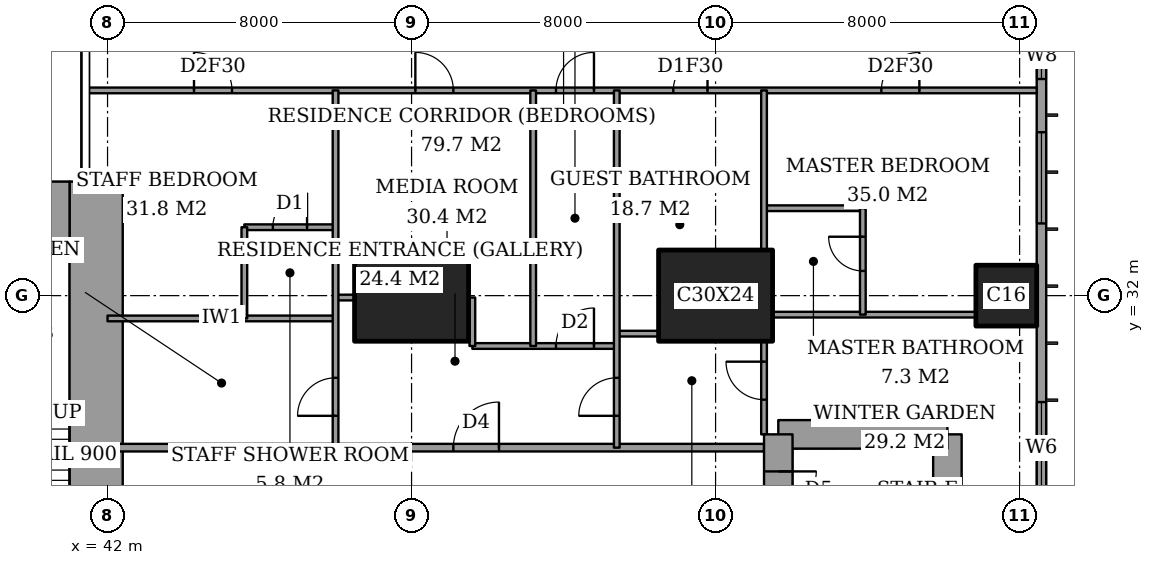
"""IFC4 building model, lengths in metres.
Left out: names, types, materials, properties, quantities, classifications, styles, units other than length and angle.
Written with IfcOpenShell. Run it as: python <this file> out.ifc"""

import sys

from ifc_helpers import new_model, si_unit, direction, frame, frame_2d, origin, origin_2d, place, context, subcontext, project, spatial, rectangle, extrude, element, fill, save


model = new_model("IFC4")
c1 = context("Model", 3, precision=1e-05, world=origin(), true_north=direction((0.0, 1.0)))
c2 = subcontext(c1, "Body", "Model", "MODEL_VIEW")
j1 = project(units=[si_unit("LENGTHUNIT", "METRE"), si_unit("PLANEANGLEUNIT", "RADIAN")], contexts=[c1])
p1 = place(None, origin())
s1 = spatial("IfcSite", under=j1, at=p1, CompositionType="ELEMENT")
p2 = place(p1, origin())
s2 = spatial("IfcBuilding", under=s1, at=p2, CompositionType="ELEMENT")
p3 = place(p2, frame((0.0, 0.0, 273.6)))
s3 = spatial("IfcBuildingStorey", under=s2, at=p3, CompositionType="ELEMENT", Elevation=273.6)
for number, where, z_axis, x_axis in (
    (1, (50.0, 32.0, 0.0), (0.0, 0.0, 1.0), (1.0, 0.0, 0.0)),
    (2, (58.0, 32.0, 0.0), (0.0, 0.0, 1.0), (1.0, 0.0, 0.0)),
):
    element("IfcColumn", number, at=place(p3, frame(where, z_axis=z_axis, x_axis=x_axis)), inside=s3, PredefinedType="COLUMN", context=c2, shape_type="SweptSolid", body=[
        extrude(rectangle(XDim=3.0, YDim=2.4, at=origin_2d()), origin(), (0.0, 0.0, 1.0), 3.6),
    ])
p4 = place(p3, frame((65.65, 32.0, 0.0), z_axis=(0.0, 0.0, 1.0), x_axis=(1.0, 0.0, 0.0)))
e3 = element("IfcColumn", 3, at=p4, inside=s3, PredefinedType="COLUMN", context=c2, shape_type="SweptSolid", body=[
    extrude(rectangle(XDim=1.6, YDim=1.6, at=origin_2d()), origin(), (0.0, 0.0, 1.0), 3.6),
])
p5 = place(p3, frame((37.85, 34.0, 0.0), z_axis=(0.0, 0.0, 1.0), x_axis=(1.0, 0.0, 0.0)))
e4 = element("IfcWall", 4, at=p5, inside=s3, PredefinedType="SHEAR", context=c2, shape_type="SweptSolid", body=[
    extrude(rectangle(XDim=3.15, YDim=2.0, at=frame_2d((1.575, 0.0))), origin(), (0.0, 0.0, 1.0), 3.6),
])
p6 = place(p3, frame((41.7, 24.85, 0.0), z_axis=(0.0, 0.0, 1.0), x_axis=(0.0, 1.0, 0.0)))
e5 = element("IfcWall", 5, at=p6, inside=s3, PredefinedType="SHEAR", context=c2, shape_type="SweptSolid", body=[
    extrude(rectangle(XDim=10.15, YDim=1.4, at=frame_2d((5.075, 0.0))), origin(), (0.0, 0.0, 1.0), 3.6),
])
p7 = place(p3, frame((64.1, 19.65, 0.0), z_axis=(0.0, 0.0, 1.0), x_axis=(0.0, 1.0, 0.0)))
e6 = element("IfcWall", 6, at=p7, inside=s3, PredefinedType="SHEAR", context=c2, shape_type="SweptSolid", body=[
    extrude(rectangle(XDim=8.7, YDim=0.75, at=frame_2d((4.35, 0.0))), origin(), (0.0, 0.0, 1.0), 3.6),
])
p8 = place(p3, frame((64.1, 28.35, 0.0), z_axis=(0.0, 0.0, 1.0), x_axis=(-1.0, 0.0, 0.0)))
e7 = element("IfcWall", 7, at=p8, inside=s3, PredefinedType="SHEAR", context=c2, shape_type="SweptSolid", body=[
    extrude(rectangle(XDim=4.45, YDim=0.75, at=frame_2d((2.225, 0.0))), origin(), (0.0, 0.0, 1.0), 3.6),
])
p9 = place(p3, frame((59.65, 28.35, 0.0), z_axis=(0.0, 0.0, 1.0), x_axis=(0.0, -1.0, 0.0)))
e8 = element("IfcWall", 8, at=p9, inside=s3, PredefinedType="SHEAR", context=c2, shape_type="SweptSolid", body=[
    extrude(rectangle(XDim=8.7, YDim=0.75, at=frame_2d((4.35, 0.0))), origin(), (0.0, 0.0, 1.0), 3.6),
])
p10 = place(p9, frame((0.975, 0.0, 0.0)))
e9 = element("IfcOpeningElement", 9, at=p10, cuts=e8, PredefinedType="OPENING", context=c2, shape_type="SweptSolid", body=[
    extrude(rectangle(XDim=1.0, YDim=2.1, at=frame_2d((0.5, 1.05))), frame((0.0, 0.385, 0.0), z_axis=(0.0, -1.0, 0.0), x_axis=(1.0, 0.0, 0.0)), (0.0, 0.0, 1.0), 0.77),
])
p11 = place(p3, frame((66.575, 3.175, 0.0), z_axis=(0.0, 0.0, 1.0), x_axis=(0.0, 1.0, 0.0)))
e10 = element("IfcWall", 10, at=p11, inside=s3, PredefinedType="SOLIDWALL", context=c2, shape_type="SweptSolid", body=[
    extrude(rectangle(XDim=41.65, YDim=0.25, at=frame_2d((20.825, 0.0))), origin(), (0.0, 0.0, 1.0), 3.6),
])
p12 = place(p11, frame((0.875, 0.0, 0.6)))
e11 = element("IfcOpeningElement", 11, at=p12, cuts=e10, PredefinedType="OPENING", context=c2, shape_type="SweptSolid", body=[
    extrude(rectangle(XDim=2.4, YDim=2.0, at=frame_2d((1.2, 1.0))), frame((0.0, 0.135, 0.0), z_axis=(0.0, -1.0, 0.0), x_axis=(1.0, 0.0, 0.0)), (0.0, 0.0, 1.0), 0.27),
])
p13 = place(p11, frame((6.0, 0.0, 0.6)))
e12 = element("IfcOpeningElement", 12, at=p13, cuts=e10, PredefinedType="OPENING", context=c2, shape_type="SweptSolid", body=[
    extrude(rectangle(XDim=1.2, YDim=2.0, at=frame_2d((0.6, 1.0))), frame((0.0, 0.135, 0.0), z_axis=(0.0, -1.0, 0.0), x_axis=(1.0, 0.0, 0.0)), (0.0, 0.0, 1.0), 0.27),
])
p14 = place(p11, frame((8.525, 0.0, 0.6)))
e13 = element("IfcOpeningElement", 13, at=p14, cuts=e10, PredefinedType="OPENING", context=c2, shape_type="SweptSolid", body=[
    extrude(rectangle(XDim=2.4, YDim=2.0, at=frame_2d((1.2, 1.0))), frame((0.0, 0.135, 0.0), z_axis=(0.0, -1.0, 0.0), x_axis=(1.0, 0.0, 0.0)), (0.0, 0.0, 1.0), 0.27),
])
p15 = place(p11, frame((15.725, 0.0, 0.6)))
e14 = element("IfcOpeningElement", 14, at=p15, cuts=e10, PredefinedType="OPENING", context=c2, shape_type="SweptSolid", body=[
    extrude(rectangle(XDim=2.4, YDim=2.0, at=frame_2d((1.2, 1.0))), frame((0.0, 0.135, 0.0), z_axis=(0.0, -1.0, 0.0), x_axis=(1.0, 0.0, 0.0)), (0.0, 0.0, 1.0), 0.27),
])
p16 = place(p11, frame((23.625, 0.0, 0.6)))
e15 = element("IfcOpeningElement", 15, at=p16, cuts=e10, PredefinedType="OPENING", context=c2, shape_type="SweptSolid", body=[
    extrude(rectangle(XDim=2.4, YDim=2.0, at=frame_2d((1.2, 1.0))), frame((0.0, 0.135, 0.0), z_axis=(0.0, -1.0, 0.0), x_axis=(1.0, 0.0, 0.0)), (0.0, 0.0, 1.0), 0.27),
])
p17 = place(p11, frame((30.725, 0.0, 0.6)))
e16 = element("IfcOpeningElement", 16, at=p17, cuts=e10, PredefinedType="OPENING", context=c2, shape_type="SweptSolid", body=[
    extrude(rectangle(XDim=2.4, YDim=2.0, at=frame_2d((1.2, 1.0))), frame((0.0, 0.135, 0.0), z_axis=(0.0, -1.0, 0.0), x_axis=(1.0, 0.0, 0.0)), (0.0, 0.0, 1.0), 0.27),
])
p18 = place(p11, frame((34.525, 0.0, 0.6)))
e17 = element("IfcOpeningElement", 17, at=p18, cuts=e10, PredefinedType="OPENING", context=c2, shape_type="SweptSolid", body=[
    extrude(rectangle(XDim=1.2, YDim=2.0, at=frame_2d((0.6, 1.0))), frame((0.0, 0.135, 0.0), z_axis=(0.0, -1.0, 0.0), x_axis=(1.0, 0.0, 0.0)), (0.0, 0.0, 1.0), 0.27),
])
p19 = place(p11, frame((38.375, 0.0, 0.6)))
e18 = element("IfcOpeningElement", 18, at=p19, cuts=e10, PredefinedType="OPENING", context=c2, shape_type="SweptSolid", body=[
    extrude(rectangle(XDim=2.4, YDim=2.0, at=frame_2d((1.2, 1.0))), frame((0.0, 0.135, 0.0), z_axis=(0.0, -1.0, 0.0), x_axis=(1.0, 0.0, 0.0)), (0.0, 0.0, 1.0), 0.27),
])
p20 = place(p3, frame((42.0, 28.0, 0.0), z_axis=(0.0, 0.0, 1.0), x_axis=(1.0, 0.0, 0.0)))
e19 = element("IfcWall", 19, at=p20, inside=s3, PredefinedType="PARTITIONING", context=c2, shape_type="SweptSolid", body=[
    extrude(rectangle(XDim=17.275, YDim=0.2, at=frame_2d((8.637, 0.0))), origin(), (0.0, 0.0, 1.0), 3.25),
])
p21 = place(p20, frame((9.1, 0.0, 0.0)))
e20 = element("IfcOpeningElement", 20, at=p21, cuts=e19, PredefinedType="OPENING", context=c2, shape_type="SweptSolid", body=[
    extrude(rectangle(XDim=1.2, YDim=2.4, at=frame_2d((0.6, 1.2))), frame((0.0, 0.11, 0.0), z_axis=(0.0, -1.0, 0.0), x_axis=(1.0, 0.0, 0.0)), (0.0, 0.0, 1.0), 0.22),
])
p22 = place(p3, frame((51.6, 30.675, 0.0), z_axis=(0.0, 0.0, 1.0), x_axis=(1.0, 0.0, 0.0)))
e21 = element("IfcWall", 21, at=p22, inside=s3, PredefinedType="PARTITIONING", context=c2, shape_type="SweptSolid", body=[
    extrude(rectangle(XDim=3.8, YDim=0.15, at=frame_2d((1.9, 0.0))), origin(), (0.0, 0.0, 1.0), 3.25),
])
p23 = place(p22, frame((2.2, 0.0, 0.0)))
e22 = element("IfcOpeningElement", 22, at=p23, cuts=e21, PredefinedType="OPENING", context=c2, shape_type="SweptSolid", body=[
    extrude(rectangle(XDim=1.0, YDim=2.1, at=frame_2d((0.5, 1.05))), frame((0.0, 0.085, 0.0), z_axis=(0.0, -1.0, 0.0), x_axis=(1.0, 0.0, 0.0)), (0.0, 0.0, 1.0), 0.17),
])
p24 = place(p3, frame((55.4, 31.0, 0.0), z_axis=(0.0, 0.0, 1.0), x_axis=(1.0, 0.0, 0.0)))
e23 = element("IfcWall", 23, at=p24, inside=s3, PredefinedType="PARTITIONING", context=c2, shape_type="SweptSolid", body=[
    extrude(rectangle(XDim=1.1, YDim=0.15, at=frame_2d((0.55, 0.0))), origin(), (0.0, 0.0, 1.0), 3.25),
])
p25 = place(p3, frame((42.0, 31.4, 0.0), z_axis=(0.0, 0.0, 1.0), x_axis=(1.0, 0.0, 0.0)))
e24 = element("IfcWall", 24, at=p25, inside=s3, PredefinedType="PARTITIONING", context=c2, shape_type="SweptSolid", body=[
    extrude(rectangle(XDim=6.0, YDim=0.15, at=frame_2d((3.0, 0.0))), origin(), (0.0, 0.0, 1.0), 3.25),
])
p26 = place(p3, frame((59.5, 31.5, 0.0), z_axis=(0.0, 0.0, 1.0), x_axis=(1.0, 0.0, 0.0)))
e25 = element("IfcWall", 25, at=p26, inside=s3, PredefinedType="PARTITIONING", context=c2, shape_type="SweptSolid", body=[
    extrude(rectangle(XDim=5.35, YDim=0.15, at=frame_2d((2.675, 0.0))), origin(), (0.0, 0.0, 1.0), 3.25),
])
p27 = place(p3, frame((48.0, 31.95, 0.0), z_axis=(0.0, 0.0, 1.0), x_axis=(1.0, 0.0, 0.0)))
e26 = element("IfcWall", 26, at=p27, inside=s3, PredefinedType="PARTITIONING", context=c2, shape_type="SweptSolid", body=[
    extrude(rectangle(XDim=0.5, YDim=0.15, at=frame_2d((0.25, 0.0))), origin(), (0.0, 0.0, 1.0), 3.25),
])
p28 = place(p3, frame((45.6, 33.8, 0.0), z_axis=(0.0, 0.0, 1.0), x_axis=(1.0, 0.0, 0.0)))
e27 = element("IfcWall", 27, at=p28, inside=s3, PredefinedType="PARTITIONING", context=c2, shape_type="SweptSolid", body=[
    extrude(rectangle(XDim=2.4, YDim=0.15, at=frame_2d((1.2, 0.0))), origin(), (0.0, 0.0, 1.0), 3.25),
])
p29 = place(p28, frame((0.75, 0.0, 0.0)))
e28 = element("IfcOpeningElement", 28, at=p29, cuts=e27, PredefinedType="OPENING", context=c2, shape_type="SweptSolid", body=[
    extrude(rectangle(XDim=0.9, YDim=2.1, at=frame_2d((0.45, 1.05))), frame((0.0, 0.085, 0.0), z_axis=(0.0, -1.0, 0.0), x_axis=(1.0, 0.0, 0.0)), (0.0, 0.0, 1.0), 0.17),
])
p30 = place(p3, frame((59.275, 34.3, 0.0), z_axis=(0.0, 0.0, 1.0), x_axis=(1.0, 0.0, 0.0)))
e29 = element("IfcWall", 29, at=p30, inside=s3, PredefinedType="PARTITIONING", context=c2, shape_type="SweptSolid", body=[
    extrude(rectangle(XDim=2.6, YDim=0.15, at=frame_2d((1.3, 0.0))), origin(), (0.0, 0.0, 1.0), 3.25),
])
p31 = place(p3, frame((41.439, 37.4, 0.0), z_axis=(0.0, 0.0, 1.0), x_axis=(1.0, 0.0, 0.0)))
e30 = element("IfcWall", 30, at=p31, inside=s3, PredefinedType="PARTITIONING", context=c2, shape_type="SweptSolid", body=[
    extrude(rectangle(XDim=25.011, YDim=0.15, at=frame_2d((12.505, 0.0))), origin(), (0.0, 0.0, 1.0), 3.25),
])
p32 = place(p31, frame((12.361, 0.0, 0.0)))
e31 = element("IfcOpeningElement", 31, at=p32, cuts=e30, PredefinedType="OPENING", context=c2, shape_type="SweptSolid", body=[
    extrude(rectangle(XDim=1.0, YDim=2.1, at=frame_2d((0.5, 1.05))), frame((0.0, 0.085, 0.0), z_axis=(0.0, -1.0, 0.0), x_axis=(1.0, 0.0, 0.0)), (0.0, 0.0, 1.0), 0.17),
])
p33 = place(p31, frame((20.924, 0.0, 0.0)))
e32 = element("IfcOpeningElement", 32, at=p33, cuts=e30, PredefinedType="OPENING", context=c2, shape_type="SweptSolid", body=[
    extrude(rectangle(XDim=1.0, YDim=2.1, at=frame_2d((0.5, 1.05))), frame((0.0, 0.085, 0.0), z_axis=(0.0, -1.0, 0.0), x_axis=(1.0, 0.0, 0.0)), (0.0, 0.0, 1.0), 0.17),
])
p34 = place(p31, frame((15.448, 0.0, 0.0)))
e33 = element("IfcOpeningElement", 33, at=p34, cuts=e30, PredefinedType="OPENING", context=c2, shape_type="SweptSolid", body=[
    extrude(rectangle(XDim=0.9, YDim=2.1, at=frame_2d((0.45, 1.05))), frame((0.0, 0.085, 0.0), z_axis=(0.0, -1.0, 0.0), x_axis=(1.0, 0.0, 0.0)), (0.0, 0.0, 1.0), 0.17),
])
p35 = place(p31, frame((8.661, 0.0, 0.0)))
e34 = element("IfcOpeningElement", 34, at=p35, cuts=e30, PredefinedType="OPENING", context=c2, shape_type="SweptSolid", body=[
    extrude(rectangle(XDim=1.0, YDim=2.1, at=frame_2d((0.5, 1.05))), frame((0.0, 0.085, 0.0), z_axis=(0.0, -1.0, 0.0), x_axis=(1.0, 0.0, 0.0)), (0.0, 0.0, 1.0), 0.17),
])
p36 = place(p31, frame((2.836, 0.0, 0.0)))
e35 = element("IfcOpeningElement", 35, at=p36, cuts=e30, PredefinedType="OPENING", context=c2, shape_type="SweptSolid", body=[
    extrude(rectangle(XDim=1.0, YDim=2.1, at=frame_2d((0.5, 1.05))), frame((0.0, 0.085, 0.0), z_axis=(0.0, -1.0, 0.0), x_axis=(1.0, 0.0, 0.0)), (0.0, 0.0, 1.0), 0.17),
])
p37 = place(p3, frame((45.6, 31.4, 0.0), z_axis=(0.0, 0.0, 1.0), x_axis=(0.0, 1.0, 0.0)))
e36 = element("IfcWall", 36, at=p37, inside=s3, PredefinedType="PARTITIONING", context=c2, shape_type="SweptSolid", body=[
    extrude(rectangle(XDim=2.4, YDim=0.15, at=frame_2d((1.2, 0.0))), origin(), (0.0, 0.0, 1.0), 3.25),
])
p38 = place(p3, frame((48.0, 28.0, 0.0), z_axis=(0.0, 0.0, 1.0), x_axis=(0.0, 1.0, 0.0)))
e37 = element("IfcWall", 37, at=p38, inside=s3, PredefinedType="PARTITIONING", context=c2, shape_type="SweptSolid", body=[
    extrude(rectangle(XDim=9.4, YDim=0.15, at=frame_2d((4.7, 0.0))), origin(), (0.0, 0.0, 1.0), 3.25),
])
p39 = place(p38, frame((0.837, 0.0, 0.0)))
e38 = element("IfcOpeningElement", 38, at=p39, cuts=e37, PredefinedType="OPENING", context=c2, shape_type="SweptSolid", body=[
    extrude(rectangle(XDim=1.0, YDim=2.1, at=frame_2d((0.5, 1.05))), frame((0.0, 0.085, 0.0), z_axis=(0.0, -1.0, 0.0), x_axis=(1.0, 0.0, 0.0)), (0.0, 0.0, 1.0), 0.17),
])
p40 = place(p3, frame((51.6, 30.675, 0.0), z_axis=(0.0, 0.0, 1.0), x_axis=(0.0, 1.0, 0.0)))
e39 = element("IfcWall", 39, at=p40, inside=s3, PredefinedType="PARTITIONING", context=c2, shape_type="SweptSolid", body=[
    extrude(rectangle(XDim=1.275, YDim=0.15, at=frame_2d((0.637, 0.0))), origin(), (0.0, 0.0, 1.0), 3.25),
])
p41 = place(p3, frame((53.2, 30.675, 0.0), z_axis=(0.0, 0.0, 1.0), x_axis=(0.0, 1.0, 0.0)))
e40 = element("IfcWall", 40, at=p41, inside=s3, PredefinedType="PARTITIONING", context=c2, shape_type="SweptSolid", body=[
    extrude(rectangle(XDim=6.725, YDim=0.15, at=frame_2d((3.362, 0.0))), origin(), (0.0, 0.0, 1.0), 3.25),
])
p42 = place(p3, frame((55.4, 28.0, 0.0), z_axis=(0.0, 0.0, 1.0), x_axis=(0.0, 1.0, 0.0)))
e41 = element("IfcWall", 41, at=p42, inside=s3, PredefinedType="PARTITIONING", context=c2, shape_type="SweptSolid", body=[
    extrude(rectangle(XDim=9.4, YDim=0.15, at=frame_2d((4.7, 0.0))), origin(), (0.0, 0.0, 1.0), 3.25),
])
p43 = place(p42, frame((0.837, 0.0, 0.0)))
e42 = element("IfcOpeningElement", 42, at=p43, cuts=e41, PredefinedType="OPENING", context=c2, shape_type="SweptSolid", body=[
    extrude(rectangle(XDim=1.0, YDim=2.1, at=frame_2d((0.5, 1.05))), frame((0.0, 0.085, 0.0), z_axis=(0.0, -1.0, 0.0), x_axis=(1.0, 0.0, 0.0)), (0.0, 0.0, 1.0), 0.17),
])
p44 = place(p3, frame((59.275, 28.35, 0.0), z_axis=(0.0, 0.0, 1.0), x_axis=(0.0, 1.0, 0.0)))
e43 = element("IfcWall", 43, at=p44, inside=s3, PredefinedType="PARTITIONING", context=c2, shape_type="SweptSolid", body=[
    extrude(rectangle(XDim=2.45, YDim=0.15, at=frame_2d((1.225, 0.0))), origin(), (0.0, 0.0, 1.0), 3.25),
])
p45 = place(p44, frame((0.913, 0.0, 0.0)))
e44 = element("IfcOpeningElement", 44, at=p45, cuts=e43, PredefinedType="OPENING", context=c2, shape_type="SweptSolid", body=[
    extrude(rectangle(XDim=1.0, YDim=2.1, at=frame_2d((0.5, 1.05))), frame((0.0, 0.085, 0.0), z_axis=(0.0, -1.0, 0.0), x_axis=(1.0, 0.0, 0.0)), (0.0, 0.0, 1.0), 0.17),
])
p46 = place(p3, frame((59.275, 33.2, 0.0), z_axis=(0.0, 0.0, 1.0), x_axis=(0.0, 1.0, 0.0)))
e45 = element("IfcWall", 45, at=p46, inside=s3, PredefinedType="PARTITIONING", context=c2, shape_type="SweptSolid", body=[
    extrude(rectangle(XDim=4.2, YDim=0.15, at=frame_2d((2.1, 0.0))), origin(), (0.0, 0.0, 1.0), 3.25),
])
p47 = place(p3, frame((61.875, 31.5, 0.0), z_axis=(0.0, 0.0, 1.0), x_axis=(0.0, 1.0, 0.0)))
e46 = element("IfcWall", 46, at=p47, inside=s3, PredefinedType="PARTITIONING", context=c2, shape_type="SweptSolid", body=[
    extrude(rectangle(XDim=2.8, YDim=0.15, at=frame_2d((1.4, 0.0))), origin(), (0.0, 0.0, 1.0), 3.25),
])
p48 = place(p47, frame((1.15, 0.0, 0.0)))
e47 = element("IfcOpeningElement", 47, at=p48, cuts=e46, PredefinedType="OPENING", context=c2, shape_type="SweptSolid", body=[
    extrude(rectangle(XDim=0.9, YDim=2.1, at=frame_2d((0.45, 1.05))), frame((0.0, 0.085, 0.0), z_axis=(0.0, -1.0, 0.0), x_axis=(1.0, 0.0, 0.0)), (0.0, 0.0, 1.0), 0.17),
])
p49 = place(p16, origin())
e48 = element("IfcWindow", 48, at=p49, inside=s3, PartitioningType="SINGLE_PANEL", PredefinedType="WINDOW", context=c2, shape_type="SweptSolid", body=[
    extrude(rectangle(XDim=2.4, YDim=2.0, at=frame_2d((1.2, 1.0))), frame((0.0, 0.03, 0.0), z_axis=(0.0, -1.0, 0.0), x_axis=(1.0, 0.0, 0.0)), (0.0, 0.0, 1.0), 0.06),
])
fill(e15, e48)
p50 = place(p17, origin())
e49 = element("IfcWindow", 49, at=p50, inside=s3, PartitioningType="SINGLE_PANEL", PredefinedType="WINDOW", context=c2, shape_type="SweptSolid", body=[
    extrude(rectangle(XDim=2.4, YDim=2.0, at=frame_2d((1.2, 1.0))), frame((0.0, 0.03, 0.0), z_axis=(0.0, -1.0, 0.0), x_axis=(1.0, 0.0, 0.0)), (0.0, 0.0, 1.0), 0.06),
])
fill(e16, e49)
p51 = place(p18, origin())
e50 = element("IfcWindow", 50, at=p51, inside=s3, PartitioningType="SINGLE_PANEL", PredefinedType="WINDOW", context=c2, shape_type="SweptSolid", body=[
    extrude(rectangle(XDim=1.2, YDim=2.0, at=frame_2d((0.6, 1.0))), frame((0.0, 0.03, 0.0), z_axis=(0.0, -1.0, 0.0), x_axis=(1.0, 0.0, 0.0)), (0.0, 0.0, 1.0), 0.06),
])
fill(e17, e50)
p52 = place(p32, origin())
e51 = element("IfcDoor", 51, at=p52, inside=s3, OperationType="SINGLE_SWING_LEFT", PredefinedType="DOOR", context=c2, shape_type="SweptSolid", body=[
    extrude(rectangle(XDim=1.0, YDim=2.1, at=frame_2d((0.5, 1.05))), frame((0.0, 0.025, 0.0), z_axis=(0.0, -1.0, 0.0), x_axis=(1.0, 0.0, 0.0)), (0.0, 0.0, 1.0), 0.05),
])
fill(e31, e51)
p53 = place(p48, origin())
e52 = element("IfcDoor", 52, at=p53, inside=s3, OperationType="SINGLE_SWING_LEFT", PredefinedType="DOOR", context=c2, shape_type="SweptSolid", body=[
    extrude(rectangle(XDim=0.9, YDim=2.1, at=frame_2d((0.45, 1.05))), frame((0.0, 0.025, 0.0), z_axis=(0.0, -1.0, 0.0), x_axis=(1.0, 0.0, 0.0)), (0.0, 0.0, 1.0), 0.05),
])
fill(e47, e52)
p54 = place(p33, origin())
e53 = element("IfcDoor", 53, at=p54, inside=s3, OperationType="SINGLE_SWING_LEFT", PredefinedType="DOOR", context=c2, shape_type="SweptSolid", body=[
    extrude(rectangle(XDim=1.0, YDim=2.1, at=frame_2d((0.5, 1.05))), frame((0.0, 0.025, 0.0), z_axis=(0.0, -1.0, 0.0), x_axis=(1.0, 0.0, 0.0)), (0.0, 0.0, 1.0), 0.05),
])
fill(e32, e53)
p55 = place(p45, origin())
e54 = element("IfcDoor", 54, at=p55, inside=s3, OperationType="SINGLE_SWING_LEFT", PredefinedType="DOOR", context=c2, shape_type="SweptSolid", body=[
    extrude(rectangle(XDim=1.0, YDim=2.1, at=frame_2d((0.5, 1.05))), frame((0.0, 0.025, 0.0), z_axis=(0.0, -1.0, 0.0), x_axis=(1.0, 0.0, 0.0)), (0.0, 0.0, 1.0), 0.05),
])
fill(e44, e54)
p56 = place(p34, origin())
e55 = element("IfcDoor", 55, at=p56, inside=s3, OperationType="SINGLE_SWING_LEFT", PredefinedType="DOOR", context=c2, shape_type="SweptSolid", body=[
    extrude(rectangle(XDim=0.9, YDim=2.1, at=frame_2d((0.45, 1.05))), frame((0.0, 0.025, 0.0), z_axis=(0.0, -1.0, 0.0), x_axis=(1.0, 0.0, 0.0)), (0.0, 0.0, 1.0), 0.05),
])
fill(e33, e55)
p57 = place(p43, origin())
e56 = element("IfcDoor", 56, at=p57, inside=s3, OperationType="SINGLE_SWING_RIGHT", PredefinedType="DOOR", context=c2, shape_type="SweptSolid", body=[
    extrude(rectangle(XDim=1.0, YDim=2.1, at=frame_2d((0.5, 1.05))), frame((0.0, 0.025, 0.0), z_axis=(0.0, -1.0, 0.0), x_axis=(1.0, 0.0, 0.0)), (0.0, 0.0, 1.0), 0.05),
])
fill(e42, e56)
p58 = place(p21, origin())
e57 = element("IfcDoor", 57, at=p58, inside=s3, OperationType="SINGLE_SWING_LEFT", PredefinedType="DOOR", context=c2, shape_type="SweptSolid", body=[
    extrude(rectangle(XDim=1.2, YDim=2.4, at=frame_2d((0.6, 1.2))), frame((0.0, 0.025, 0.0), z_axis=(0.0, -1.0, 0.0), x_axis=(1.0, 0.0, 0.0)), (0.0, 0.0, 1.0), 0.05),
])
fill(e20, e57)
p59 = place(p23, origin())
e58 = element("IfcDoor", 58, at=p59, inside=s3, OperationType="SINGLE_SWING_LEFT", PredefinedType="DOOR", context=c2, shape_type="SweptSolid", body=[
    extrude(rectangle(XDim=1.0, YDim=2.1, at=frame_2d((0.5, 1.05))), frame((0.0, 0.025, 0.0), z_axis=(0.0, -1.0, 0.0), x_axis=(1.0, 0.0, 0.0)), (0.0, 0.0, 1.0), 0.05),
])
fill(e22, e58)
p60 = place(p35, origin())
e59 = element("IfcDoor", 59, at=p60, inside=s3, OperationType="SINGLE_SWING_RIGHT", PredefinedType="DOOR", context=c2, shape_type="SweptSolid", body=[
    extrude(rectangle(XDim=1.0, YDim=2.1, at=frame_2d((0.5, 1.05))), frame((0.0, 0.025, 0.0), z_axis=(0.0, -1.0, 0.0), x_axis=(1.0, 0.0, 0.0)), (0.0, 0.0, 1.0), 0.05),
])
fill(e34, e59)
p61 = place(p29, origin())
e60 = element("IfcDoor", 60, at=p61, inside=s3, OperationType="SINGLE_SWING_LEFT", PredefinedType="DOOR", context=c2, shape_type="SweptSolid", body=[
    extrude(rectangle(XDim=0.9, YDim=2.1, at=frame_2d((0.45, 1.05))), frame((0.0, 0.025, 0.0), z_axis=(0.0, -1.0, 0.0), x_axis=(1.0, 0.0, 0.0)), (0.0, 0.0, 1.0), 0.05),
])
fill(e28, e60)
p62 = place(p36, origin())
e61 = element("IfcDoor", 61, at=p62, inside=s3, OperationType="SINGLE_SWING_RIGHT", PredefinedType="DOOR", context=c2, shape_type="SweptSolid", body=[
    extrude(rectangle(XDim=1.0, YDim=2.1, at=frame_2d((0.5, 1.05))), frame((0.0, 0.025, 0.0), z_axis=(0.0, -1.0, 0.0), x_axis=(1.0, 0.0, 0.0)), (0.0, 0.0, 1.0), 0.05),
])
fill(e35, e61)
p63 = place(p39, origin())
e62 = element("IfcDoor", 62, at=p63, inside=s3, OperationType="SINGLE_SWING_RIGHT", PredefinedType="DOOR", context=c2, shape_type="SweptSolid", body=[
    extrude(rectangle(XDim=1.0, YDim=2.1, at=frame_2d((0.5, 1.05))), frame((0.0, 0.025, 0.0), z_axis=(0.0, -1.0, 0.0), x_axis=(1.0, 0.0, 0.0)), (0.0, 0.0, 1.0), 0.05),
])
fill(e38, e62)
p64 = place(p10, origin())
e63 = element("IfcDoor", 63, at=p64, inside=s3, OperationType="SINGLE_SWING_RIGHT", PredefinedType="DOOR", context=c2, shape_type="SweptSolid", body=[
    extrude(rectangle(XDim=1.0, YDim=2.1, at=frame_2d((0.5, 1.05))), frame((0.0, 0.025, 0.0), z_axis=(0.0, -1.0, 0.0), x_axis=(1.0, 0.0, 0.0)), (0.0, 0.0, 1.0), 0.05),
])
fill(e9, e63)
save(model, sys.argv[1])
